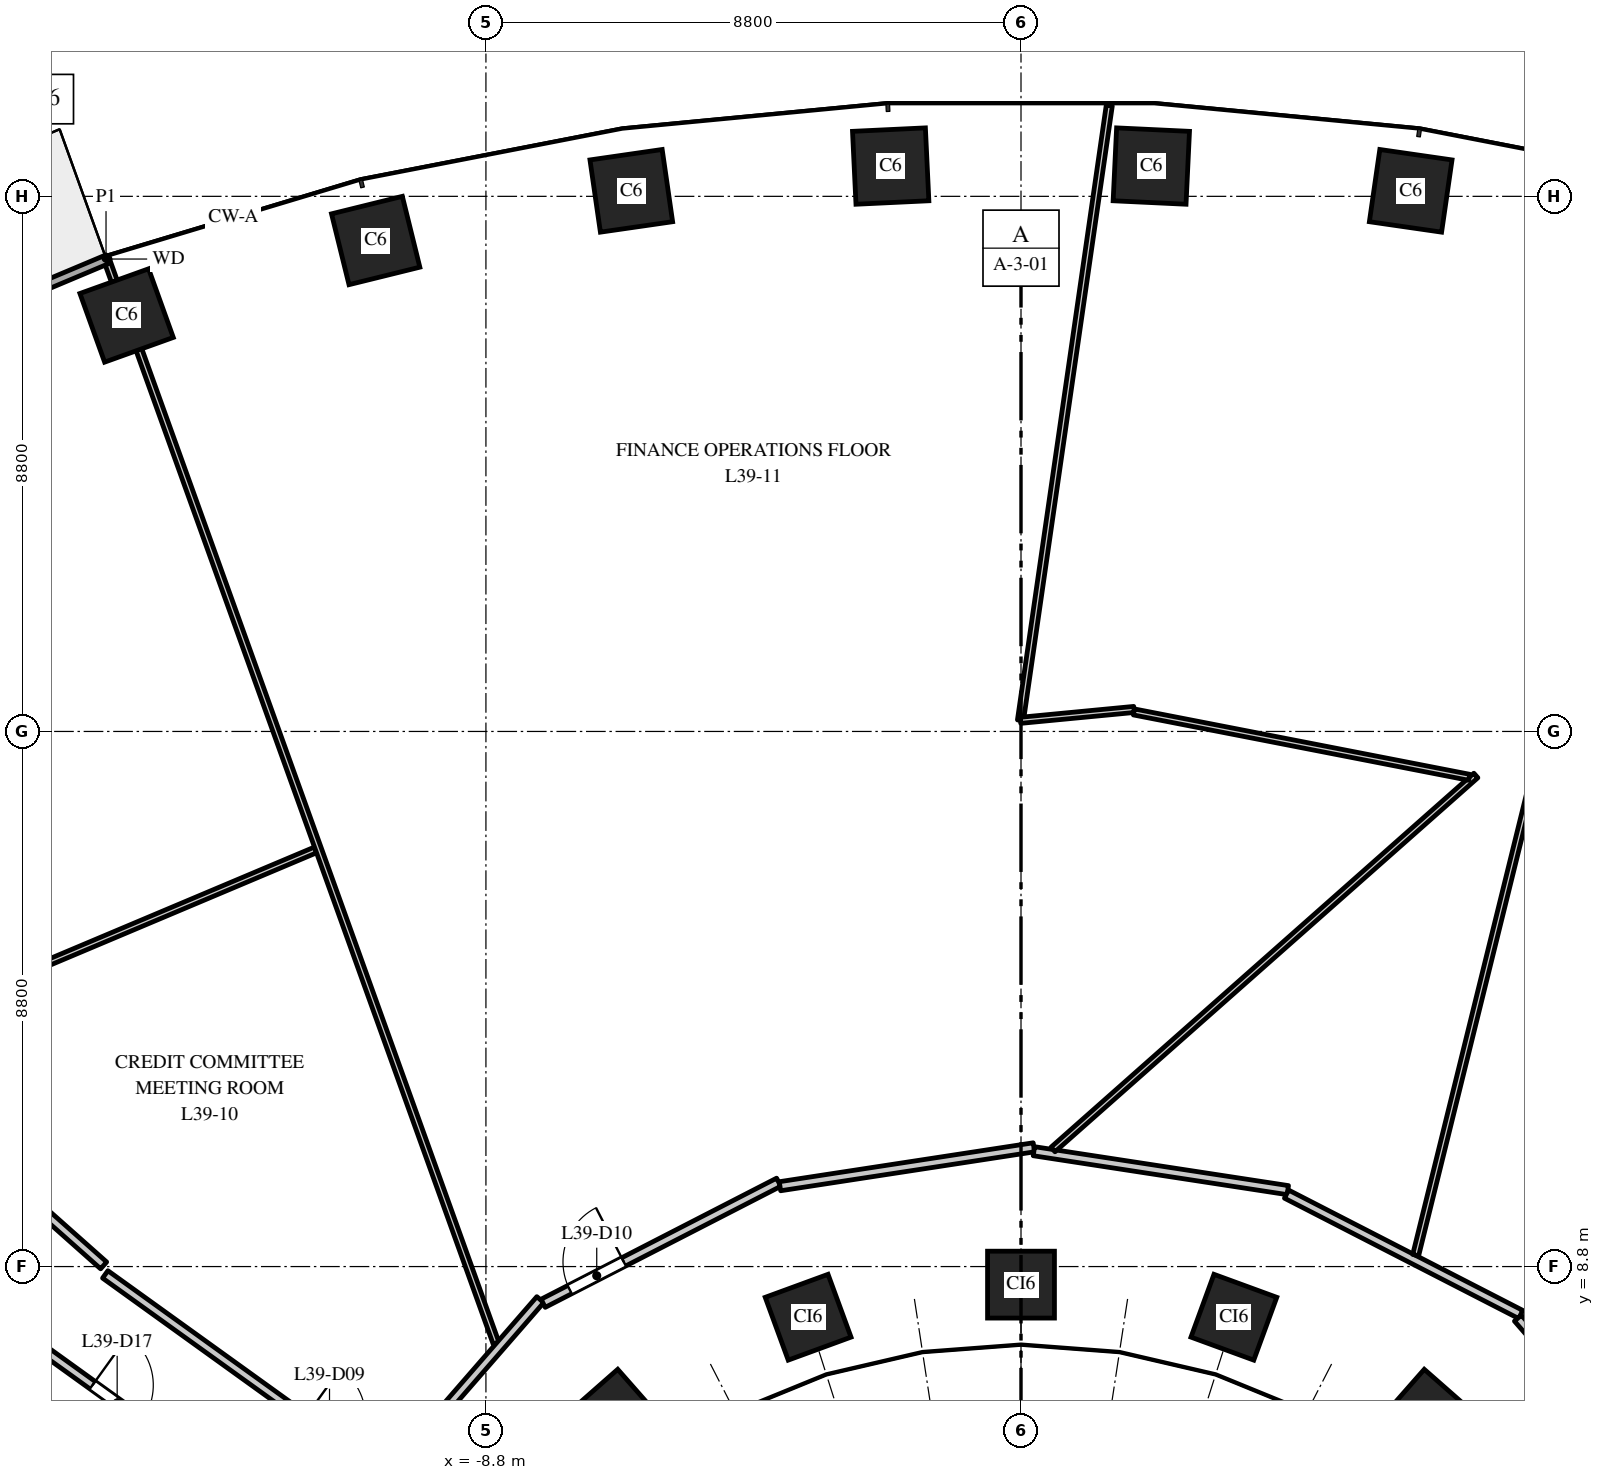
"""IFC4 building model, lengths in metres.
Left out: names, types, materials, properties, quantities, classifications, styles, units other than length and angle.
Written with IfcOpenShell. Run it as: python <this file> out.ifc"""

import sys

from ifc_helpers import new_model, si_unit, direction, frame, frame_2d, origin, origin_2d, place, context, subcontext, project, spatial, rectangle, extrude, element, fill, save


model = new_model("IFC4")
c1 = context("Model", 3, precision=1e-05, world=origin(), true_north=direction((0.0, 1.0)))
c2 = subcontext(c1, "Body", "Model", "MODEL_VIEW")
j1 = project(units=[si_unit("LENGTHUNIT", "METRE"), si_unit("PLANEANGLEUNIT", "RADIAN")], contexts=[c1])
p1 = place(None, origin())
s1 = spatial("IfcSite", under=j1, at=p1, CompositionType="ELEMENT")
p2 = place(p1, origin())
s2 = spatial("IfcBuilding", under=s1, at=p2, CompositionType="ELEMENT")
p3 = place(p2, frame((0.0, 0.0, 170.0)))
s3 = spatial("IfcBuildingStorey", under=s2, at=p3, CompositionType="ELEMENT", Elevation=170.0)
for number, where, z_axis, x_axis in (
    (1, (6.409, 26.491, 0.0), (0.0, 0.0, 1.0), (-0.99, 0.143, 0.0)),
    (2, (2.143, 26.898, 0.0), (0.0, 0.0, 1.0), (-0.999, 0.048, 0.0)),
    (3, (-2.143, 26.898, 0.0), (0.0, 0.0, 1.0), (-0.999, -0.048, 0.0)),
    (4, (-6.409, 26.491, 0.0), (0.0, 0.0, 1.0), (-0.99, -0.143, 0.0)),
    (5, (-10.613, 25.674, 0.0), (0.0, 0.0, 1.0), (-0.971, -0.24, 0.0)),
    (6, (-14.709, 24.441, 0.0), (0.0, 0.0, 1.0), (-0.941, -0.338, 0.0)),
):
    element("IfcColumn", number, at=place(p3, frame(where, z_axis=z_axis, x_axis=x_axis)), inside=s3, PredefinedType="COLUMN", context=c2, shape_type="SweptSolid", body=[
        extrude(rectangle(XDim=1.2, YDim=1.2, at=origin_2d()), origin(), (0.0, 0.0, 1.0), 4.0),
    ])
for number, where, z_axis, x_axis in (
    (7, (6.682, 6.334, 0.0), (0.0, 0.0, 1.0), (-0.751, 0.66, 0.0)),
    (8, (3.501, 7.967, 0.0), (0.0, 0.0, 1.0), (-0.939, 0.344, 0.0)),
    (9, (0.0, 8.503, 0.0), (0.0, 0.0, 1.0), (-1.0, 0.0, 0.0)),
    (10, (-3.501, 7.967, 0.0), (0.0, 0.0, 1.0), (-0.939, -0.344, 0.0)),
    (11, (-6.682, 6.334, 0.0), (0.0, 0.0, 1.0), (-0.751, -0.66, 0.0)),
):
    element("IfcColumn", number, at=place(p3, frame(where, z_axis=z_axis, x_axis=x_axis)), inside=s3, PredefinedType="COLUMN", context=c2, shape_type="SweptSolid", body=[
        extrude(rectangle(XDim=1.1, YDim=1.1, at=origin_2d()), origin(), (0.0, 0.0, 1.0), 4.0),
    ])
p4 = place(p3, frame((-15.018, 25.369, 0.0), z_axis=(0.0, 0.0, 1.0), x_axis=(-0.921816985161, -0.387625393736, 0.0)))
e12 = element("IfcWall", 12, at=p4, inside=s3, PredefinedType="STANDARD", context=c2, shape_type="SweptSolid", body=[
    extrude(rectangle(XDim=4.426, YDim=0.15, at=frame_2d((2.213, 0.0))), origin(), (0.0, 0.0, 1.0), 3.7),
])
p5 = place(p4, frame((1.713, 0.0, 0.0)))
e13 = element("IfcOpeningElement", 13, at=p5, cuts=e12, PredefinedType="OPENING", context=c2, shape_type="SweptSolid", body=[
    extrude(rectangle(XDim=1.0, YDim=2.4, at=frame_2d((0.5, 1.2))), frame((0.0, 0.085, 0.0), z_axis=(0.0, -1.0, 0.0), x_axis=(1.0, 0.0, 0.0)), (0.0, 0.0, 1.0), 0.17),
])
p6 = place(p3, frame((-17.372, 13.219, 0.0), z_axis=(0.0, 0.0, 1.0), x_axis=(0.921428289763, 0.38854846136, 0.0)))
e14 = element("IfcWall", 14, at=p6, inside=s3, PredefinedType="PARTITIONING", context=c2, shape_type="SweptSolid", body=[
    extrude(rectangle(XDim=6.262, YDim=0.1, at=frame_2d((3.131, 0.0))), origin(), (0.0, 0.0, 1.0), 2.85),
])
p7 = place(p3, frame((-16.5, 7.735, 0.0), z_axis=(0.0, 0.0, 1.0), x_axis=(0.811616692984, -0.584190331715, 0.0)))
e15 = element("IfcWall", 15, at=p7, inside=s3, PredefinedType="PARTITIONING", context=c2, shape_type="SweptSolid", body=[
    extrude(rectangle(XDim=6.578, YDim=0.15, at=frame_2d((3.289, 0.0))), origin(), (0.0, 0.0, 1.0), 3.7),
])
p8 = place(p7, frame((1.515, 0.0, 0.0)))
e16 = element("IfcOpeningElement", 16, at=p8, cuts=e15, PredefinedType="OPENING", context=c2, shape_type="SweptSolid", body=[
    extrude(rectangle(XDim=1.0, YDim=2.1, at=frame_2d((0.5, 1.05))), frame((0.0, 0.085, 0.0), z_axis=(0.0, -1.0, 0.0), x_axis=(1.0, 0.0, 0.0)), (0.0, 0.0, 1.0), 0.17),
])
p9 = place(p3, frame((-15.061, 8.671, 0.0), z_axis=(0.0, 0.0, 1.0), x_axis=(0.811697765448, -0.584077681106, 0.0)))
e17 = element("IfcWall", 17, at=p9, inside=s3, PredefinedType="PARTITIONING", context=c2, shape_type="SweptSolid", body=[
    extrude(rectangle(XDim=5.694, YDim=0.15, at=frame_2d((2.847, 0.0))), origin(), (0.0, 0.0, 1.0), 3.7),
])
p10 = place(p9, frame((4.044, 0.0, 0.0)))
e18 = element("IfcOpeningElement", 18, at=p10, cuts=e17, PredefinedType="OPENING", context=c2, shape_type="SweptSolid", body=[
    extrude(rectangle(XDim=1.0, YDim=2.1, at=frame_2d((0.5, 1.05))), frame((0.0, 0.085, 0.0), z_axis=(0.0, -1.0, 0.0), x_axis=(1.0, 0.0, 0.0)), (0.0, 0.0, 1.0), 0.17),
])
p11 = place(p3, frame((-15.048, 25.383, 0.0), z_axis=(0.0, 0.0, 1.0), x_axis=(0.33832146485, -0.941030598026, 0.0)))
e19 = element("IfcWall", 19, at=p11, inside=s3, PredefinedType="PARTITIONING", context=c2, shape_type="SweptSolid", body=[
    extrude(rectangle(XDim=18.964, YDim=0.1, at=frame_2d((9.482, 0.0))), origin(), (0.0, 0.0, 1.0), 2.85),
])
p12 = place(p3, frame((-10.439, 5.345, 0.0), z_axis=(0.0, 0.0, 1.0), x_axis=(0.656405809938, 0.754407988213, 0.0)))
e20 = element("IfcWall", 20, at=p12, inside=s3, PredefinedType="PARTITIONING", context=c2, shape_type="SweptSolid", body=[
    extrude(rectangle(XDim=3.859, YDim=0.15, at=frame_2d((1.929, 0.0))), origin(), (0.0, 0.0, 1.0), 2.75),
])
p13 = place(p3, frame((-7.859, 8.196, 0.0), z_axis=(0.0, 0.0, 1.0), x_axis=(0.889405670308, 0.457118752213, 0.0)))
e21 = element("IfcWall", 21, at=p13, inside=s3, PredefinedType="PARTITIONING", context=c2, shape_type="SweptSolid", body=[
    extrude(rectangle(XDim=4.355, YDim=0.15, at=frame_2d((2.178, 0.0))), origin(), (0.0, 0.0, 1.0), 2.85),
])
p14 = place(p13, frame((0.491, 0.0, 0.0)))
e22 = element("IfcOpeningElement", 22, at=p14, cuts=e21, PredefinedType="OPENING", context=c2, shape_type="SweptSolid", body=[
    extrude(rectangle(XDim=1.0, YDim=2.1, at=frame_2d((0.5, 1.05))), frame((0.0, 0.085, 0.0), z_axis=(0.0, -1.0, 0.0), x_axis=(1.0, 0.0, 0.0)), (0.0, 0.0, 1.0), 0.17),
])
p15 = place(p3, frame((-3.964, 10.121, 0.0), z_axis=(0.0, 0.0, 1.0), x_axis=(0.988463044045, 0.151462241359, 0.0)))
e23 = element("IfcWall", 23, at=p15, inside=s3, PredefinedType="PARTITIONING", context=c2, shape_type="SweptSolid", body=[
    extrude(rectangle(XDim=4.225, YDim=0.15, at=frame_2d((2.112, 0.0))), origin(), (0.0, 0.0, 1.0), 2.85),
])
p16 = place(p3, frame((-0.009, 17.783, 0.0), z_axis=(0.0, 0.0, 1.0), x_axis=(0.143003679494, 0.989722156795, 0.0)))
e24 = element("IfcWall", 24, at=p16, inside=s3, PredefinedType="PARTITIONING", context=c2, shape_type="SweptSolid", body=[
    extrude(rectangle(XDim=10.216, YDim=0.1, at=frame_2d((5.108, 0.0))), origin(), (0.0, 0.0, 1.0), 2.9),
])
p17 = place(p3, frame((-0.009, 17.783, 0.0), z_axis=(0.0, 0.0, 1.0), x_axis=(0.99544210385, 0.095367803179, 0.0)))
e25 = element("IfcWall", 25, at=p17, inside=s3, PredefinedType="PARTITIONING", context=c2, shape_type="SweptSolid", body=[
    extrude(rectangle(XDim=1.876, YDim=0.1, at=frame_2d((0.938, 0.0))), origin(), (0.0, 0.0, 1.0), 3.7),
])
p18 = place(p3, frame((0.212, 10.697, 0.0), z_axis=(0.0, 0.0, 1.0), x_axis=(0.988454390794, -0.151518702874, 0.0)))
e26 = element("IfcWall", 26, at=p18, inside=s3, PredefinedType="PARTITIONING", context=c2, shape_type="SweptSolid", body=[
    extrude(rectangle(XDim=4.225, YDim=0.15, at=frame_2d((2.112, 0.0))), origin(), (0.0, 0.0, 1.0), 2.85),
])
p19 = place(p3, frame((0.526, 10.725, 0.0), z_axis=(0.0, 0.0, 1.0), x_axis=(0.749086896245, 0.662471751755, 0.0)))
e27 = element("IfcWall", 27, at=p19, inside=s3, PredefinedType="PARTITIONING", context=c2, shape_type="SweptSolid", body=[
    extrude(rectangle(XDim=9.285, YDim=0.1, at=frame_2d((4.642, 0.0))), origin(), (0.0, 0.0, 1.0), 2.85),
])
p20 = place(p3, frame((1.857, 17.921, 0.0), z_axis=(0.0, 0.0, 1.0), x_axis=(0.981529813142, -0.191309241579, 0.0)))
e28 = element("IfcWall", 28, at=p20, inside=s3, PredefinedType="PARTITIONING", context=c2, shape_type="SweptSolid", body=[
    extrude(rectangle(XDim=5.619, YDim=0.1, at=frame_2d((2.81, 0.0))), origin(), (0.0, 0.0, 1.0), 2.85),
])
p21 = place(p3, frame((4.367, 9.991, 0.0), z_axis=(0.0, 0.0, 1.0), x_axis=(0.889480321924, -0.456973475061, 0.0)))
e29 = element("IfcWall", 29, at=p21, inside=s3, PredefinedType="PARTITIONING", context=c2, shape_type="SweptSolid", body=[
    extrude(rectangle(XDim=4.331, YDim=0.15, at=frame_2d((2.165, 0.0))), origin(), (0.0, 0.0, 1.0), 2.85),
])
p22 = place(p3, frame((6.491, 8.988, 0.0), z_axis=(0.0, 0.0, 1.0), x_axis=(0.239892267022, 0.970799515978, 0.0)))
e30 = element("IfcWall", 30, at=p22, inside=s3, PredefinedType="PARTITIONING", context=c2, shape_type="SweptSolid", body=[
    extrude(rectangle(XDim=7.891, YDim=0.1, at=frame_2d((3.946, 0.0))), origin(), (0.0, 0.0, 1.0), 2.85),
])
p23 = place(p3, frame((8.172, 7.952, 0.0), z_axis=(0.0, 0.0, 1.0), x_axis=(0.656169966724, -0.754613129206, 0.0)))
e31 = element("IfcWall", 31, at=p23, inside=s3, PredefinedType="PARTITIONING", context=c2, shape_type="SweptSolid", body=[
    extrude(rectangle(XDim=3.455, YDim=0.15, at=frame_2d((1.727, 0.0))), origin(), (0.0, 0.0, 1.0), 2.75),
])
p24 = place(p3, frame((-16.352, 9.942, 0.0), z_axis=(0.0, 0.0, 1.0), x_axis=(0.747926695066, -0.663781333579, 0.0)))
e32 = element("IfcWall", 32, at=p24, inside=s3, PredefinedType="PARTITIONING", context=c2, shape_type="SweptSolid", body=[
    extrude(rectangle(XDim=1.691, YDim=0.15, at=frame_2d((0.846, 0.0))), origin(), (0.0, 0.0, 1.0), 3.7),
])
p25 = place(p14, origin())
e33 = element("IfcDoor", 33, at=p25, inside=s3, OperationType="SINGLE_SWING_RIGHT", PredefinedType="DOOR", context=c2, shape_type="SweptSolid", body=[
    extrude(rectangle(XDim=1.0, YDim=2.1, at=frame_2d((0.5, 1.05))), frame((0.0, 0.025, 0.0), z_axis=(0.0, -1.0, 0.0), x_axis=(1.0, 0.0, 0.0)), (0.0, 0.0, 1.0), 0.05),
])
fill(e22, e33)
p26 = place(p8, origin())
e34 = element("IfcDoor", 34, at=p26, inside=s3, OperationType="SINGLE_SWING_LEFT", PredefinedType="DOOR", context=c2, shape_type="SweptSolid", body=[
    extrude(rectangle(XDim=1.0, YDim=2.1, at=frame_2d((0.5, 1.05))), frame((0.0, 0.025, 0.0), z_axis=(0.0, -1.0, 0.0), x_axis=(1.0, 0.0, 0.0)), (0.0, 0.0, 1.0), 0.05),
])
fill(e16, e34)
save(model, sys.argv[1])
